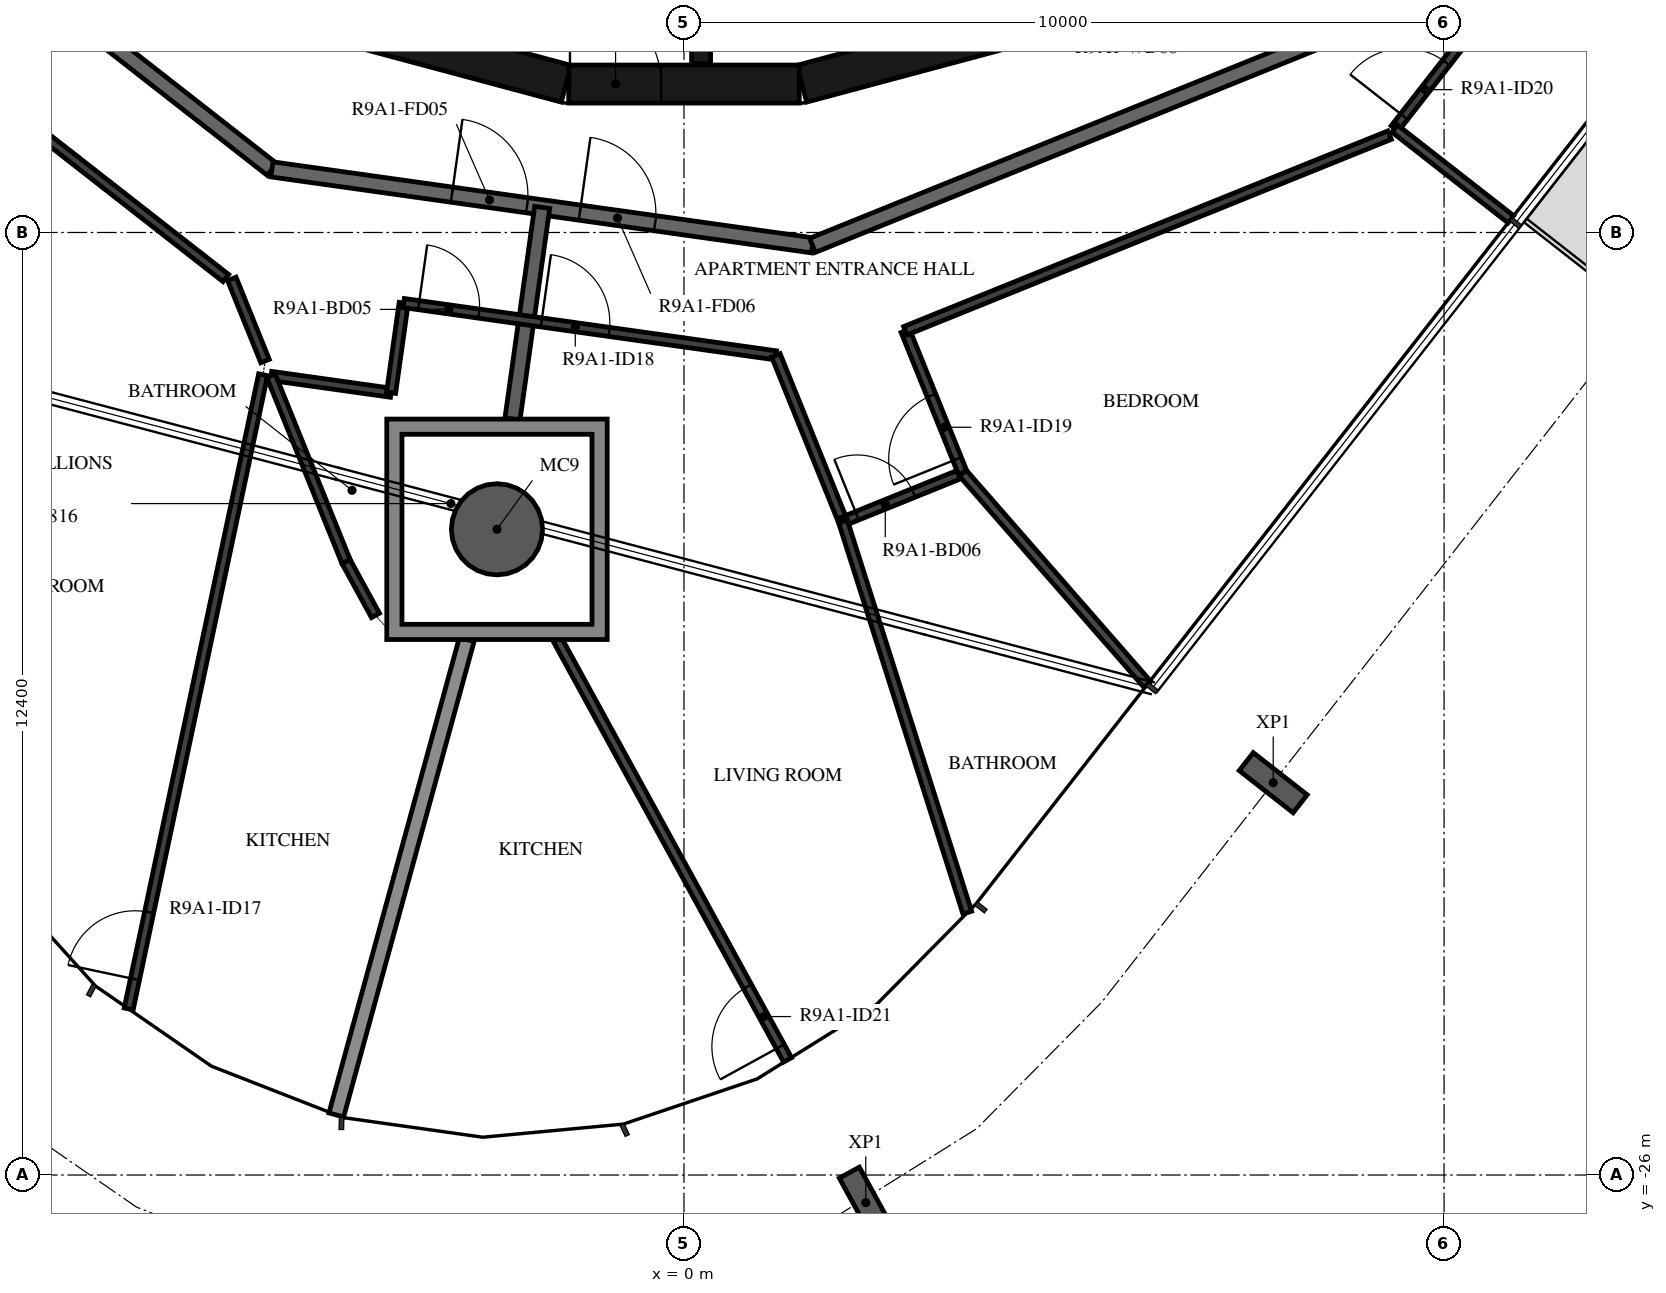
"""IFC4 building model, lengths in metres.
Left out: names, types, materials, properties, quantities, classifications, styles, units other than length and angle.
Written with IfcOpenShell. Run it as: python <this file> out.ifc"""

import sys

from ifc_helpers import new_model, si_unit, direction, frame, frame_2d, origin, origin_2d, place, context, subcontext, project, spatial, polyline, rectangle, hollow_circle, i_section, outline, extrude, element, fill, save


model = new_model("IFC4")
c1 = context("Model", 3, precision=1e-05, world=origin(), true_north=direction((0.0, 1.0)))
c2 = subcontext(c1, "Body", "Model", "MODEL_VIEW")
j1 = project(units=[si_unit("LENGTHUNIT", "METRE"), si_unit("PLANEANGLEUNIT", "RADIAN")], contexts=[c1])
p1 = place(None, origin())
s1 = spatial("IfcSite", under=j1, at=p1, CompositionType="ELEMENT")
p2 = place(p1, origin())
s2 = spatial("IfcBuilding", under=s1, at=p2, CompositionType="ELEMENT")
p3 = place(p2, frame((0.0, 0.0, 336.5)))
s3 = spatial("IfcBuildingStorey", under=s2, at=p3, CompositionType="ELEMENT", Elevation=336.5)
p4 = place(p3, frame((-2.46, -17.505, -0.38), z_axis=(0.0, 0.0, 1.0), x_axis=(1.0, 0.0, 0.0)))
e1 = element("IfcColumn", 1, at=p4, inside=s3, PredefinedType="COLUMN", context=c2, shape_type="SweptSolid", body=[
    extrude(hollow_circle(Radius=0.6, WallThickness=0.03, at=origin_2d()), origin(), (0.0, 0.0, 1.0), 3.5),
])
for number, where, z_axis, x_axis in (
    (2, (2.392, -26.363, -0.38), (0.0, 0.0, 1.0), (-0.877, -0.48, 0.0)),
    (3, (7.752, -20.839, -0.38), (0.0, 0.0, 1.0), (-0.616, -0.788, 0.0)),
):
    element("IfcColumn", number, at=place(p3, frame(where, z_axis=z_axis, x_axis=x_axis)), inside=s3, PredefinedType="COLUMN", context=c2, shape_type="SweptSolid", body=[
        extrude(i_section(OverallWidth=0.3, OverallDepth=0.9, WebThickness=0.019, FlangeThickness=0.035, FilletRadius=0.03, at=origin_2d()), origin(), (0.0, 0.0, 1.0), 3.5),
    ])
for number, where, z_axis, x_axis in (
    (4, (1.55, -11.643, 0.0), (0.0, 0.0, 1.0), (0.966, 0.259, 0.0)),
    (5, (-4.479, -10.858, 0.0), (0.0, 0.0, 1.0), (0.966, -0.259, 0.0)),
):
    element("IfcWall", number, at=place(p3, frame(where, z_axis=z_axis, x_axis=x_axis)), inside=s3, PredefinedType="SHEAR", context=c2, shape_type="SweptSolid", body=[
        extrude(rectangle(XDim=3.033, YDim=0.5, at=frame_2d((1.516, 0.0))), origin(), (0.0, 0.0, 1.0), 3.12),
    ])
p5 = place(p3, frame((-1.516, -11.647, 0.0), z_axis=(0.0, 0.0, 1.0), x_axis=(1.0, 0.0, 0.0)))
e6 = element("IfcWall", 6, at=p5, inside=s3, PredefinedType="SHEAR", context=c2, shape_type="SweptSolid", body=[
    extrude(rectangle(XDim=3.033, YDim=0.5, at=frame_2d((1.516, 0.0))), origin(), (0.0, 0.0, 1.0), 3.12),
])
p6 = place(p5, frame((0.016, 0.0, 0.0)))
e7 = element("IfcOpeningElement", 7, at=p6, cuts=e6, PredefinedType="OPENING", context=c2, shape_type="SweptSolid", body=[
    extrude(rectangle(XDim=1.2, YDim=2.1, at=frame_2d((0.6, 1.05))), frame((0.0, 0.26, 0.0), z_axis=(0.0, -1.0, 0.0), x_axis=(1.0, 0.0, 0.0)), (0.0, 0.0, 1.0), 0.52),
])
p7 = place(p3, frame((0.225, -8.97, 0.0), z_axis=(0.0, 0.0, 1.0), x_axis=(0.0, -1.0, 0.0)))
e8 = element("IfcWall", 8, at=p7, inside=s3, PredefinedType="SHEAR", context=c2, shape_type="SweptSolid", body=[
    extrude(rectangle(XDim=2.41, YDim=0.25, at=frame_2d((1.205, 0.0))), origin(), (0.0, 0.0, 1.0), 3.12),
])
p8 = place(p3, frame((-11.079, -8.349, 0.0), z_axis=(0.0, 0.0, 1.0), x_axis=(0.78800478687, -0.615669112324, 0.0)))
e9 = element("IfcWall", 9, at=p8, inside=s3, PredefinedType="STANDARD", context=c2, shape_type="SweptSolid", body=[
    extrude(rectangle(XDim=7.181, YDim=0.2, at=frame_2d((3.591, 0.0))), origin(), (0.0, 0.0, 1.0), 3.12),
])
p9 = place(p3, frame((-5.42, -12.77, 0.0), z_axis=(0.0, 0.0, 1.0), x_axis=(0.990270565508, -0.139155334385, 0.0)))
e10 = element("IfcWall", 10, at=p9, inside=s3, PredefinedType="STANDARD", context=c2, shape_type="SweptSolid", body=[
    extrude(rectangle(XDim=7.181, YDim=0.2, at=frame_2d((3.59, 0.0))), origin(), (0.0, 0.0, 1.0), 3.12),
])
p10 = place(p9, frame((2.39, 0.0, 0.0)))
e11 = element("IfcOpeningElement", 11, at=p10, cuts=e10, PredefinedType="OPENING", context=c2, shape_type="SweptSolid", body=[
    extrude(rectangle(XDim=1.0, YDim=2.1, at=frame_2d((0.5, 1.05))), frame((0.0, 0.11, 0.0), z_axis=(0.0, -1.0, 0.0), x_axis=(1.0, 0.0, 0.0)), (0.0, 0.0, 1.0), 0.22),
])
p11 = place(p9, frame((4.091, 0.0, 0.0)))
e12 = element("IfcOpeningElement", 12, at=p11, cuts=e10, PredefinedType="OPENING", context=c2, shape_type="SweptSolid", body=[
    extrude(rectangle(XDim=1.0, YDim=2.1, at=frame_2d((0.5, 1.05))), frame((0.0, 0.11, 0.0), z_axis=(0.0, -1.0, 0.0), x_axis=(1.0, 0.0, 0.0)), (0.0, 0.0, 1.0), 0.22),
])
p12 = place(p3, frame((1.691, -13.769, 0.0), z_axis=(0.0, 0.0, 1.0), x_axis=(0.92717916932, 0.374618189599, 0.0)))
e13 = element("IfcWall", 13, at=p12, inside=s3, PredefinedType="STANDARD", context=c2, shape_type="SweptSolid", body=[
    extrude(rectangle(XDim=7.181, YDim=0.2, at=frame_2d((3.591, 0.0))), origin(), (0.0, 0.0, 1.0), 3.12),
])
p13 = place(p3, frame((-2.256, -16.055, 0.0), z_axis=(0.0, 0.0, 1.0), x_axis=(0.139148428478, 0.990271535919, 0.0)))
e14 = element("IfcWall", 14, at=p13, inside=s3, PredefinedType="STANDARD", context=c2, shape_type="SweptSolid", body=[
    extrude(rectangle(XDim=2.812, YDim=0.2, at=frame_2d((1.406, 0.0))), origin(), (0.0, 0.0, 1.0), 3.12),
])
p14 = place(p3, frame((-4.574, -25.21, 0.0), z_axis=(0.0, 0.0, 1.0), x_axis=(0.264579024648, 0.964364007892, 0.0)))
e15 = element("IfcWall", 15, at=p14, inside=s3, PredefinedType="STANDARD", context=c2, shape_type="SweptSolid", body=[
    extrude(rectangle(XDim=6.486, YDim=0.2, at=frame_2d((3.243, 0.0))), origin(), (0.0, 0.0, 1.0), 2.73),
])
p15 = place(p3, frame((-12.319, -9.283, 0.0), z_axis=(0.0, 0.0, 1.0), x_axis=(0.788000268464, -0.61567489546, 0.0)))
e16 = element("IfcWall", 16, at=p15, inside=s3, PredefinedType="PARTITIONING", context=c2, shape_type="SweptSolid", body=[
    extrude(rectangle(XDim=7.985, YDim=0.12, at=frame_2d((3.992, 0.0))), origin(), (0.0, 0.0, 1.0), 3.12),
])
p16 = place(p15, frame((3.619, 0.0, 0.0)))
e17 = element("IfcOpeningElement", 17, at=p16, cuts=e16, PredefinedType="OPENING", context=c2, shape_type="SweptSolid", body=[
    extrude(rectangle(XDim=0.9, YDim=2.1, at=frame_2d((0.45, 1.05))), frame((0.0, 0.07, 0.0), z_axis=(0.0, -1.0, 0.0), x_axis=(1.0, 0.0, 0.0)), (0.0, 0.0, 1.0), 0.14),
])
p17 = place(p3, frame((-5.948, -14.21, 0.0), z_axis=(0.0, 0.0, 1.0), x_axis=(0.374601530156, -0.927185900241, 0.0)))
e18 = element("IfcWall", 18, at=p17, inside=s3, PredefinedType="PARTITIONING", context=c2, shape_type="SweptSolid", body=[
    extrude(rectangle(XDim=1.166, YDim=0.12, at=frame_2d((0.583, 0.0))), origin(), (0.0, 0.0, 1.0), 3.12),
])
p18 = place(p3, frame((-5.433, -15.487, 0.0), z_axis=(0.0, 0.0, 1.0), x_axis=(0.990268451053, -0.139170380644, 0.0)))
e19 = element("IfcWall", 19, at=p18, inside=s3, PredefinedType="PARTITIONING", context=c2, shape_type="SweptSolid", body=[
    extrude(rectangle(XDim=1.595, YDim=0.12, at=frame_2d((0.797, 0.0))), origin(), (0.0, 0.0, 1.0), 3.12),
])
p19 = place(p3, frame((-3.854, -15.708, 0.0), z_axis=(0.0, 0.0, 1.0), x_axis=(0.139298773474, 0.99025039849, 0.0)))
e20 = element("IfcWall", 20, at=p19, inside=s3, PredefinedType="PARTITIONING", context=c2, shape_type="SweptSolid", body=[
    extrude(rectangle(XDim=1.192, YDim=0.12, at=frame_2d((0.596, 0.0))), origin(), (0.0, 0.0, 1.0), 3.12),
])
p20 = place(p3, frame((-3.688, -14.528, 0.0), z_axis=(0.0, 0.0, 1.0), x_axis=(0.990273698817, -0.139133035013, 0.0)))
e21 = element("IfcWall", 21, at=p20, inside=s3, PredefinedType="PARTITIONING", context=c2, shape_type="SweptSolid", body=[
    extrude(rectangle(XDim=4.945, YDim=0.12, at=frame_2d((2.472, 0.0))), origin(), (0.0, 0.0, 1.0), 3.12),
])
p21 = place(p20, frame((0.2, 0.0, 0.0)))
e22 = element("IfcOpeningElement", 22, at=p21, cuts=e21, PredefinedType="OPENING", context=c2, shape_type="SweptSolid", body=[
    extrude(rectangle(XDim=0.8, YDim=2.1, at=frame_2d((0.4, 1.05))), frame((0.0, 0.07, 0.0), z_axis=(0.0, -1.0, 0.0), x_axis=(1.0, 0.0, 0.0)), (0.0, 0.0, 1.0), 0.14),
])
p22 = place(p20, frame((1.83, 0.0, 0.0)))
e23 = element("IfcOpeningElement", 23, at=p22, cuts=e21, PredefinedType="OPENING", context=c2, shape_type="SweptSolid", body=[
    extrude(rectangle(XDim=0.9, YDim=2.1, at=frame_2d((0.45, 1.05))), frame((0.0, 0.07, 0.0), z_axis=(0.0, -1.0, 0.0), x_axis=(1.0, 0.0, 0.0)), (0.0, 0.0, 1.0), 0.14),
])
p23 = place(p3, frame((-7.305, -23.815, 0.0), z_axis=(0.0, 0.0, 1.0), x_axis=(0.207366409306, 0.978263345062, 0.0)))
e24 = element("IfcWall", 24, at=p23, inside=s3, PredefinedType="PARTITIONING", context=c2, shape_type="SweptSolid", body=[
    extrude(rectangle(XDim=8.529, YDim=0.12, at=frame_2d((4.264, 0.0))), origin(), (0.0, 0.0, 1.0), 3.12),
])
p24 = place(p23, frame((0.4, 0.0, 0.0)))
e25 = element("IfcOpeningElement", 25, at=p24, cuts=e24, PredefinedType="OPENING", context=c2, shape_type="SweptSolid", body=[
    extrude(rectangle(XDim=0.9, YDim=2.1, at=frame_2d((0.45, 1.05))), frame((0.0, 0.07, 0.0), z_axis=(0.0, -1.0, 0.0), x_axis=(1.0, 0.0, 0.0)), (0.0, 0.0, 1.0), 0.14),
])
p25 = place(p3, frame((-4.059, -18.638, 0.0), z_axis=(0.0, 0.0, 1.0), x_axis=(-0.479488268542, 0.877548289458, 0.0)))
e26 = element("IfcWall", 26, at=p25, inside=s3, PredefinedType="PARTITIONING", context=c2, shape_type="SweptSolid", body=[
    extrude(rectangle(XDim=0.807, YDim=0.12, at=frame_2d((0.403, 0.0))), origin(), (0.0, 0.0, 1.0), 3.12),
])
p26 = place(p3, frame((-4.445, -17.93, 0.0), z_axis=(0.0, 0.0, 1.0), x_axis=(-0.374614676827, 0.927180588616, 0.0)))
e27 = element("IfcWall", 27, at=p26, inside=s3, PredefinedType="PARTITIONING", context=c2, shape_type="SweptSolid", body=[
    extrude(rectangle(XDim=2.635, YDim=0.12, at=frame_2d((1.318, 0.0))), origin(), (0.0, 0.0, 1.0), 3.12),
])
p27 = place(p3, frame((1.209, -15.216, 0.0), z_axis=(0.0, 0.0, 1.0), x_axis=(0.374531550488, -0.927214170345, 0.0)))
e28 = element("IfcWall", 28, at=p27, inside=s3, PredefinedType="PARTITIONING", context=c2, shape_type="SweptSolid", body=[
    extrude(rectangle(XDim=2.357, YDim=0.12, at=frame_2d((1.179, 0.0))), origin(), (0.0, 0.0, 1.0), 3.12),
])
p28 = place(p3, frame((2.092, -17.402, 0.0), z_axis=(0.0, 0.0, 1.0), x_axis=(0.927153589835, 0.374681492546, 0.0)))
e29 = element("IfcWall", 29, at=p28, inside=s3, PredefinedType="PARTITIONING", context=c2, shape_type="SweptSolid", body=[
    extrude(rectangle(XDim=1.7, YDim=0.12, at=frame_2d((0.85, 0.0))), origin(), (0.0, 0.0, 1.0), 3.12),
])
p29 = place(p28, frame((0.2, 0.0, 0.0)))
e30 = element("IfcOpeningElement", 30, at=p29, cuts=e29, PredefinedType="OPENING", context=c2, shape_type="SweptSolid", body=[
    extrude(rectangle(XDim=0.8, YDim=2.1, at=frame_2d((0.4, 1.05))), frame((0.0, 0.07, 0.0), z_axis=(0.0, -1.0, 0.0), x_axis=(1.0, 0.0, 0.0)), (0.0, 0.0, 1.0), 0.14),
])
p30 = place(p3, frame((3.668, -16.765, 0.0), z_axis=(0.0, 0.0, 1.0), x_axis=(-0.374621045498, 0.927178015416, 0.0)))
e31 = element("IfcWall", 31, at=p30, inside=s3, PredefinedType="PARTITIONING", context=c2, shape_type="SweptSolid", body=[
    extrude(rectangle(XDim=2.018, YDim=0.12, at=frame_2d((1.009, 0.0))), origin(), (0.0, 0.0, 1.0), 3.12),
])
p31 = place(p30, frame((0.2, 0.0, 0.0)))
e32 = element("IfcOpeningElement", 32, at=p31, cuts=e31, PredefinedType="OPENING", context=c2, shape_type="SweptSolid", body=[
    extrude(rectangle(XDim=0.9, YDim=2.1, at=frame_2d((0.45, 1.05))), frame((0.0, 0.07, 0.0), z_axis=(0.0, -1.0, 0.0), x_axis=(1.0, 0.0, 0.0)), (0.0, 0.0, 1.0), 0.14),
])
p32 = place(p3, frame((2.912, -14.894, 0.0), z_axis=(0.0, 0.0, 1.0), x_axis=(0.927182280165, 0.374610490174, 0.0)))
e33 = element("IfcWall", 33, at=p32, inside=s3, PredefinedType="PARTITIONING", context=c2, shape_type="SweptSolid", body=[
    extrude(rectangle(XDim=6.872, YDim=0.12, at=frame_2d((3.436, 0.0))), origin(), (0.0, 0.0, 1.0), 3.12),
])
p33 = place(p3, frame((9.351, -12.233, 0.0), z_axis=(0.0, 0.0, 1.0), x_axis=(0.615678207218, 0.787997680933, 0.0)))
e34 = element("IfcWall", 34, at=p33, inside=s3, PredefinedType="PARTITIONING", context=c2, shape_type="SweptSolid", body=[
    extrude(rectangle(XDim=7.765, YDim=0.12, at=frame_2d((3.883, 0.0))), origin(), (0.0, 0.0, 1.0), 3.12),
])
p34 = place(p33, frame((0.2, 0.0, 0.0)))
e35 = element("IfcOpeningElement", 35, at=p34, cuts=e34, PredefinedType="OPENING", context=c2, shape_type="SweptSolid", body=[
    extrude(rectangle(XDim=0.9, YDim=2.1, at=frame_2d((0.45, 1.05))), frame((0.0, 0.07, 0.0), z_axis=(0.0, -1.0, 0.0), x_axis=(1.0, 0.0, 0.0)), (0.0, 0.0, 1.0), 0.14),
])
p35 = place(p3, frame((1.363, -24.485, 0.0), z_axis=(0.0, 0.0, 1.0), x_axis=(-0.480397592444, 0.877050827018, 0.0)))
e36 = element("IfcWall", 36, at=p35, inside=s3, PredefinedType="PARTITIONING", context=c2, shape_type="SweptSolid", body=[
    extrude(rectangle(XDim=6.306, YDim=0.12, at=frame_2d((3.153, 0.0))), origin(), (0.0, 0.0, 1.0), 2.73),
])
p36 = place(p35, frame((0.2, 0.0, 0.0)))
e37 = element("IfcOpeningElement", 37, at=p36, cuts=e36, PredefinedType="OPENING", context=c2, shape_type="SweptSolid", body=[
    extrude(rectangle(XDim=0.9, YDim=2.1, at=frame_2d((0.45, 1.05))), frame((0.0, 0.07, 0.0), z_axis=(0.0, -1.0, 0.0), x_axis=(1.0, 0.0, 0.0)), (0.0, 0.0, 1.0), 0.14),
])
p37 = place(p3, frame((3.728, -22.548, 0.0), z_axis=(0.0, 0.0, 1.0), x_axis=(-0.302890110312, 0.953025488156, 0.0)))
e38 = element("IfcWall", 38, at=p37, inside=s3, PredefinedType="PARTITIONING", context=c2, shape_type="SweptSolid", body=[
    extrude(rectangle(XDim=5.4, YDim=0.12, at=frame_2d((2.7, 0.0))), origin(), (0.0, 0.0, 1.0), 3.12),
])
p38 = place(p3, frame((6.097, -19.546, 0.0), z_axis=(0.0, 0.0, 1.0), x_axis=(-0.657863093444, 0.753137537429, 0.0)))
e39 = element("IfcWall", 39, at=p38, inside=s3, PredefinedType="PARTITIONING", context=c2, shape_type="SweptSolid", body=[
    extrude(rectangle(XDim=3.693, YDim=0.12, at=frame_2d((1.846, 0.0))), origin(), (0.0, 0.0, 1.0), 2.73),
])
p39 = place(p3, frame((10.878, -13.427, 0.0), z_axis=(0.0, 0.0, 1.0), x_axis=(-0.787980458379, 0.615700249483, 0.0)))
e40 = element("IfcWall", 40, at=p39, inside=s3, PredefinedType="PARTITIONING", context=c2, shape_type="SweptSolid", body=[
    extrude(rectangle(XDim=1.939, YDim=0.12, at=frame_2d((0.969, 0.0))), origin(), (0.0, 0.0, 1.0), 2.73),
])
p40 = place(p3, origin())
e41 = element("IfcWall", 41, at=p40, inside=s3, PredefinedType="STANDARD", context=c2, shape_type="SweptSolid", body=[
    extrude(outline(polyline([(-1.01, -16.055), (-1.01, -18.955), (-3.91, -18.955), (-3.91, -16.055), (-1.01, -16.055)]), holes=[polyline([(-3.71, -18.755), (-1.21, -18.755), (-1.21, -16.255), (-3.71, -16.255), (-3.71, -18.755)])]), origin(), (0.0, 0.0, 1.0), 3.12),
])
p41 = place(p6, origin())
e42 = element("IfcDoor", 42, at=p41, inside=s3, OperationType="SINGLE_SWING_RIGHT", PredefinedType="DOOR", context=c2, shape_type="SweptSolid", body=[
    extrude(rectangle(XDim=1.2, YDim=2.1, at=frame_2d((0.6, 1.05))), frame((0.0, 0.025, 0.0), z_axis=(0.0, -1.0, 0.0), x_axis=(1.0, 0.0, 0.0)), (0.0, 0.0, 1.0), 0.05),
])
fill(e7, e42)
p42 = place(p10, origin())
e43 = element("IfcDoor", 43, at=p42, inside=s3, OperationType="SINGLE_SWING_RIGHT", PredefinedType="DOOR", context=c2, shape_type="SweptSolid", body=[
    extrude(rectangle(XDim=1.0, YDim=2.1, at=frame_2d((0.5, 1.05))), frame((0.0, 0.025, 0.0), z_axis=(0.0, -1.0, 0.0), x_axis=(1.0, 0.0, 0.0)), (0.0, 0.0, 1.0), 0.05),
])
fill(e11, e43)
p43 = place(p21, origin())
e44 = element("IfcDoor", 44, at=p43, inside=s3, OperationType="SINGLE_SWING_RIGHT", PredefinedType="DOOR", context=c2, shape_type="SweptSolid", body=[
    extrude(rectangle(XDim=0.8, YDim=2.1, at=frame_2d((0.4, 1.05))), frame((0.0, 0.025, 0.0), z_axis=(0.0, -1.0, 0.0), x_axis=(1.0, 0.0, 0.0)), (0.0, 0.0, 1.0), 0.05),
])
fill(e22, e44)
p44 = place(p24, origin())
e45 = element("IfcDoor", 45, at=p44, inside=s3, OperationType="SINGLE_SWING_RIGHT", PredefinedType="DOOR", context=c2, shape_type="SweptSolid", body=[
    extrude(rectangle(XDim=0.9, YDim=2.1, at=frame_2d((0.45, 1.05))), frame((0.0, 0.025, 0.0), z_axis=(0.0, -1.0, 0.0), x_axis=(1.0, 0.0, 0.0)), (0.0, 0.0, 1.0), 0.05),
])
fill(e25, e45)
p45 = place(p11, origin())
e46 = element("IfcDoor", 46, at=p45, inside=s3, OperationType="SINGLE_SWING_RIGHT", PredefinedType="DOOR", context=c2, shape_type="SweptSolid", body=[
    extrude(rectangle(XDim=1.0, YDim=2.1, at=frame_2d((0.5, 1.05))), frame((0.0, 0.025, 0.0), z_axis=(0.0, -1.0, 0.0), x_axis=(1.0, 0.0, 0.0)), (0.0, 0.0, 1.0), 0.05),
])
fill(e12, e46)
p46 = place(p22, origin())
e47 = element("IfcDoor", 47, at=p46, inside=s3, OperationType="SINGLE_SWING_RIGHT", PredefinedType="DOOR", context=c2, shape_type="SweptSolid", body=[
    extrude(rectangle(XDim=0.9, YDim=2.1, at=frame_2d((0.45, 1.05))), frame((0.0, 0.025, 0.0), z_axis=(0.0, -1.0, 0.0), x_axis=(1.0, 0.0, 0.0)), (0.0, 0.0, 1.0), 0.05),
])
fill(e23, e47)
p47 = place(p29, origin())
e48 = element("IfcDoor", 48, at=p47, inside=s3, OperationType="SINGLE_SWING_LEFT", PredefinedType="DOOR", context=c2, shape_type="SweptSolid", body=[
    extrude(rectangle(XDim=0.8, YDim=2.1, at=frame_2d((0.4, 1.05))), frame((0.0, 0.025, 0.0), z_axis=(0.0, -1.0, 0.0), x_axis=(1.0, 0.0, 0.0)), (0.0, 0.0, 1.0), 0.05),
])
fill(e30, e48)
p48 = place(p31, origin())
e49 = element("IfcDoor", 49, at=p48, inside=s3, OperationType="SINGLE_SWING_RIGHT", PredefinedType="DOOR", context=c2, shape_type="SweptSolid", body=[
    extrude(rectangle(XDim=0.9, YDim=2.1, at=frame_2d((0.45, 1.05))), frame((0.0, 0.025, 0.0), z_axis=(0.0, -1.0, 0.0), x_axis=(1.0, 0.0, 0.0)), (0.0, 0.0, 1.0), 0.05),
])
fill(e32, e49)
p49 = place(p34, origin())
e50 = element("IfcDoor", 50, at=p49, inside=s3, OperationType="SINGLE_SWING_LEFT", PredefinedType="DOOR", context=c2, shape_type="SweptSolid", body=[
    extrude(rectangle(XDim=0.9, YDim=2.1, at=frame_2d((0.45, 1.05))), frame((0.0, 0.025, 0.0), z_axis=(0.0, -1.0, 0.0), x_axis=(1.0, 0.0, 0.0)), (0.0, 0.0, 1.0), 0.05),
])
fill(e35, e50)
p50 = place(p36, origin())
e51 = element("IfcDoor", 51, at=p50, inside=s3, OperationType="SINGLE_SWING_LEFT", PredefinedType="DOOR", context=c2, shape_type="SweptSolid", body=[
    extrude(rectangle(XDim=0.9, YDim=2.1, at=frame_2d((0.45, 1.05))), frame((0.0, 0.025, 0.0), z_axis=(0.0, -1.0, 0.0), x_axis=(1.0, 0.0, 0.0)), (0.0, 0.0, 1.0), 0.05),
])
fill(e37, e51)
save(model, sys.argv[1])
